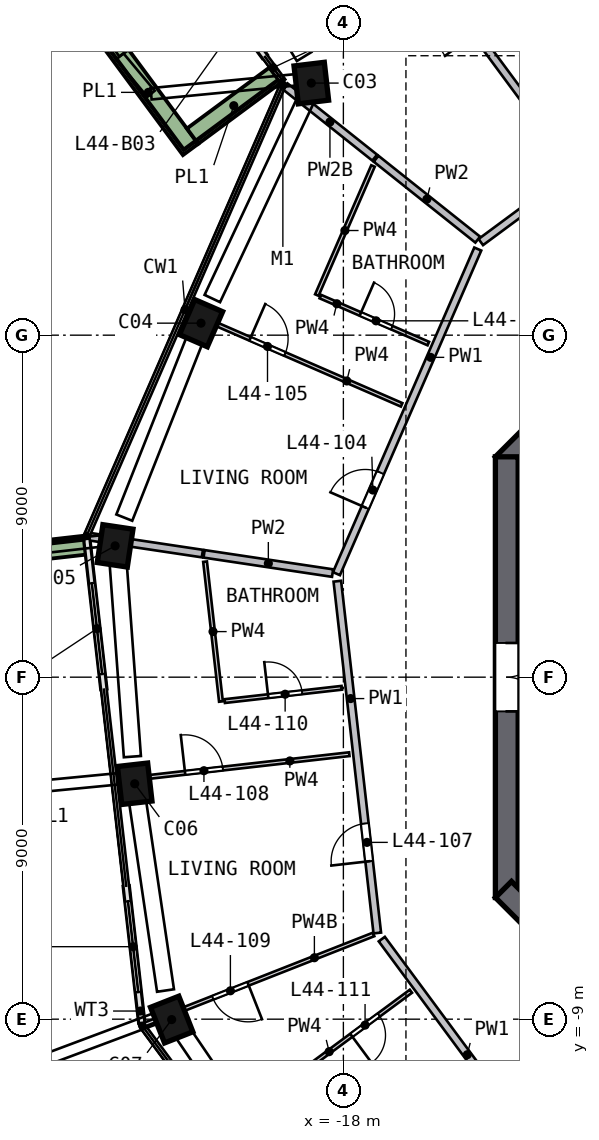
"""IFC4 building model, lengths in metres.
Left out: names, types, materials, properties, quantities, classifications, styles, units other than length and angle.
Written with IfcOpenShell. Run it as: python <this file> out.ifc"""

import sys

from ifc_helpers import new_model, si_unit, direction, frame, frame_2d, origin, origin_2d, place, context, subcontext, project, spatial, polyline, rectangle, outline, extrude, element, fill, save


model = new_model("IFC4")
c1 = context("Model", 3, precision=1e-05, world=origin(), true_north=direction((0.0, 1.0)))
c2 = subcontext(c1, "Body", "Model", "MODEL_VIEW")
j1 = project(units=[si_unit("LENGTHUNIT", "METRE"), si_unit("PLANEANGLEUNIT", "RADIAN")], contexts=[c1])
p1 = place(None, origin())
s1 = spatial("IfcSite", under=j1, at=p1, CompositionType="ELEMENT")
p2 = place(p1, origin())
s2 = spatial("IfcBuilding", under=s1, at=p2, CompositionType="ELEMENT")
p3 = place(p2, frame((0.0, 0.0, 183.5)))
s3 = spatial("IfcBuildingStorey", under=s2, at=p3, CompositionType="ELEMENT", Elevation=183.5)
p4 = place(p3, frame((-18.754, 15.742, 0.0), z_axis=(-0.074113797, -0.089772712, 0.993200889), x_axis=(-0.119035276, 0.989615937, 0.080566128)))
e1 = element("IfcColumn", 1, at=p4, inside=s3, PredefinedType="COLUMN", context=c2, shape_type="SweptSolid", body=[
    extrude(rectangle(XDim=1.0, YDim=0.8, at=origin_2d()), origin(), (0.0, 0.0, 1.0), 3.212),
])
p5 = place(p3, frame((-21.693, 9.441, 0.0), z_axis=(-0.044031928, -0.103577696, 0.99364624), x_axis=(-0.39648645, -0.911115934, -0.112544433)))
e2 = element("IfcColumn", 2, at=p5, inside=s3, PredefinedType="COLUMN", context=c2, shape_type="SweptSolid", body=[
    extrude(rectangle(XDim=1.0, YDim=0.8, at=origin_2d()), origin(), (0.0, 0.0, 1.0), 3.21),
])
p6 = place(p3, frame((-23.987, 3.594, 0.0), z_axis=(-0.016117069, -0.114187915, 0.993328425), x_axis=(0.147173067, 0.982365713, 0.115315628)))
e3 = element("IfcColumn", 3, at=p6, inside=s3, PredefinedType="COLUMN", context=c2, shape_type="SweptSolid", body=[
    extrude(rectangle(XDim=1.0, YDim=0.8, at=origin_2d()), origin(), (0.0, 0.0, 1.0), 3.211),
])
p7 = place(p3, frame((-23.507, -2.67, 0.0), z_axis=(0.013612645, -0.111714949, 0.993647053), x_axis=(0.111814551, -0.987336251, -0.112537254)))
e4 = element("IfcColumn", 4, at=p7, inside=s3, PredefinedType="COLUMN", context=c2, shape_type="SweptSolid", body=[
    extrude(rectangle(XDim=1.0, YDim=0.8, at=origin_2d()), origin(), (0.0, 0.0, 1.0), 3.21),
])
p8 = place(p3, frame((-22.57, -8.882, 0.0), z_axis=(0.043181416, -0.106965234, 0.993324622), x_axis=(-0.364010929, 0.924224428, 0.115348383)))
e5 = element("IfcColumn", 5, at=p8, inside=s3, PredefinedType="COLUMN", context=c2, shape_type="SweptSolid", body=[
    extrude(rectangle(XDim=1.0, YDim=0.8, at=origin_2d()), origin(), (0.0, 0.0, 1.0), 3.211),
])
p9 = place(p3, frame((-5.587, 13.788, 0.0), z_axis=(0.0, 0.0, 1.0), x_axis=(-0.707106781, -0.707106781, 0.0)))
e6 = element("IfcWall", 6, at=p9, inside=s3, PredefinedType="SHEAR", context=c2, shape_type="SweptSolid", body=[
    extrude(rectangle(XDim=11.598, YDim=0.6, at=frame_2d((5.799, 0.0))), origin(), (0.0, 0.0, 1.0), 3.5),
])
p10 = place(p3, frame((-13.7, 5.799, 0.0), z_axis=(0.0, 0.0, 1.0), x_axis=(0.0, -1.0, 0.0)))
e7 = element("IfcWall", 7, at=p10, inside=s3, PredefinedType="SHEAR", context=c2, shape_type="SweptSolid", body=[
    extrude(rectangle(XDim=11.598, YDim=0.6, at=frame_2d((5.799, 0.0))), origin(), (0.0, 0.0, 1.0), 3.5),
])
p11 = place(p10, frame((4.899, 0.0, 0.0)))
e8 = element("IfcOpeningElement", 8, at=p11, cuts=e7, PredefinedType="OPENING", context=c2, shape_type="SweptSolid", body=[
    extrude(rectangle(XDim=1.8, YDim=2.1, at=frame_2d((0.9, 1.05))), frame((0.0, 0.31, 0.0), z_axis=(0.0, -1.0, 0.0), x_axis=(1.0, 0.0, 0.0)), (0.0, 0.0, 1.0), 0.62),
])
p12 = place(p3, frame((-13.788, -5.587, 0.0), z_axis=(0.0, 0.0, 1.0), x_axis=(0.707106781, -0.707106781, 0.0)))
e9 = element("IfcWall", 9, at=p12, inside=s3, PredefinedType="SHEAR", context=c2, shape_type="SweptSolid", body=[
    extrude(rectangle(XDim=11.598, YDim=0.6, at=frame_2d((5.799, 0.0))), origin(), (0.0, 0.0, 1.0), 3.5),
])
p13 = place(p12, frame((2.099, 0.0, 0.0)))
e10 = element("IfcOpeningElement", 10, at=p13, cuts=e9, PredefinedType="OPENING", context=c2, shape_type="SweptSolid", body=[
    extrude(rectangle(XDim=1.2, YDim=2.1, at=frame_2d((0.6, 1.05))), frame((0.0, 0.31, 0.0), z_axis=(0.0, -1.0, 0.0), x_axis=(1.0, 0.0, 0.0)), (0.0, 0.0, 1.0), 0.62),
])
p14 = place(p3, frame((-21.978, 18.916, 0.0), z_axis=(0.0, 0.0, 1.0), x_axis=(0.594570692, -0.80404334, 0.0)))
e11 = element("IfcWall", 11, at=p14, inside=s3, PredefinedType="SOLIDWALL", context=c2, shape_type="SweptSolid", body=[
    extrude(rectangle(XDim=3.21, YDim=0.15, at=frame_2d((1.605, 0.0))), origin(), (0.0, 0.0, 1.0), 2.475),
])
p15 = place(p14, frame((1.31, 0.0, 0.0)))
e12 = element("IfcOpeningElement", 12, at=p15, cuts=e11, PredefinedType="OPENING", context=c2, shape_type="SweptSolid", body=[
    extrude(rectangle(XDim=1.5, YDim=2.4, at=frame_2d((0.75, 1.2))), frame((0.0, 0.085, 0.0), z_axis=(0.0, -1.0, 0.0), x_axis=(1.0, 0.0, 0.0)), (0.0, 0.0, 1.0), 0.17),
])
p16 = place(p3, frame((-24.751, 3.63, 0.0), z_axis=(0.0, 0.0, 1.0), x_axis=(0.112801985, -0.993617488, 0.0)))
e13 = element("IfcWall", 13, at=p16, inside=s3, PredefinedType="SOLIDWALL", context=c2, shape_type="SweptSolid", body=[
    extrude(rectangle(XDim=3.967, YDim=0.15, at=frame_2d((1.984, 0.0))), origin(), (0.0, 0.0, 1.0), 2.475),
])
p17 = place(p16, frame((1.167, 0.0, 0.0)))
e14 = element("IfcOpeningElement", 14, at=p17, cuts=e13, PredefinedType="OPENING", context=c2, shape_type="SweptSolid", body=[
    extrude(rectangle(XDim=2.4, YDim=2.4, at=frame_2d((1.2, 1.2))), frame((0.0, 0.085, 0.0), z_axis=(0.0, -1.0, 0.0), x_axis=(1.0, 0.0, 0.0)), (0.0, 0.0, 1.0), 0.17),
])
p18 = place(p3, frame((-23.714, -5.502, 0.0), z_axis=(0.0, 0.0, 1.0), x_axis=(0.112844416, -0.99361267, 0.0)))
e15 = element("IfcWall", 15, at=p18, inside=s3, PredefinedType="SOLIDWALL", context=c2, shape_type="SweptSolid", body=[
    extrude(rectangle(XDim=3.609, YDim=0.15, at=frame_2d((1.804, 0.0))), origin(), (0.0, 0.0, 1.0), 2.475),
])
p19 = place(p18, frame((0.4, 0.0, 0.0)))
e16 = element("IfcOpeningElement", 16, at=p19, cuts=e15, PredefinedType="OPENING", context=c2, shape_type="SweptSolid", body=[
    extrude(rectangle(XDim=2.4, YDim=2.4, at=frame_2d((1.2, 1.2))), frame((0.0, 0.085, 0.0), z_axis=(0.0, -1.0, 0.0), x_axis=(1.0, 0.0, 0.0)), (0.0, 0.0, 1.0), 0.17),
])
p20 = place(p3, frame((-24.243, 16.893, 0.0), z_axis=(0.0, 0.0, 1.0), x_axis=(0.594510416, -0.804087909, 0.0)))
e17 = element("IfcWall", 17, at=p20, inside=s3, PredefinedType="SOLIDWALL", context=c2, shape_type="SweptSolid", body=[
    extrude(rectangle(XDim=3.738, YDim=0.5, at=frame_2d((1.869, 0.0))), origin(), (0.0, 0.0, 1.0), 0.7),
])
p21 = place(p3, frame((-21.969, 14.237, 0.0), z_axis=(0.0, 0.0, 1.0), x_axis=(0.804127263, 0.594457185, 0.0)))
e18 = element("IfcWall", 18, at=p21, inside=s3, PredefinedType="SOLIDWALL", context=c2, shape_type="SweptSolid", body=[
    extrude(rectangle(XDim=2.699, YDim=0.5, at=frame_2d((1.35, 0.0))), origin(), (0.0, 0.0, 1.0), 0.7),
])
p22 = place(p3, frame((-24.81, 3.472, 0.0), z_axis=(0.0, 0.0, 1.0), x_axis=(-0.993617508, -0.112801803, 0.0)))
e19 = element("IfcWall", 19, at=p22, inside=s3, PredefinedType="SOLIDWALL", context=c2, shape_type="SweptSolid", body=[
    extrude(rectangle(XDim=3.199, YDim=0.5, at=frame_2d((1.6, 0.0))), origin(), (0.0, 0.0, 1.0), 0.7),
])
p23 = place(p3, origin())
e20 = element("IfcWall", 20, at=p23, inside=s3, PredefinedType="SOLIDWALL", context=c2, shape_type="SweptSolid", body=[
    extrude(outline(polyline([(-13.4, 3.9), (-9.9, 3.9), (-9.9, 3.7), (-12.9, 3.7), (-12.9, 1.4), (-9.9, 1.4), (-9.9, 1.2), (-13.4, 1.2), (-13.4, 3.9)])), origin(), (0.0, 0.0, 1.0), 3.19),
])
p24 = place(p3, origin())
e21 = element("IfcWall", 21, at=p24, inside=s3, PredefinedType="SOLIDWALL", context=c2, shape_type="SweptSolid", body=[
    extrude(outline(polyline([(-13.4, -3.9), (-13.4, -1.2), (-9.9, -1.2), (-9.9, -1.4), (-12.9, -1.4), (-12.9, -3.7), (-9.9, -3.7), (-9.9, -3.9), (-13.4, -3.9)])), origin(), (0.0, 0.0, 1.0), 3.19),
])
p25 = place(p3, frame((-17.108, -6.732, 0.0), z_axis=(0.0, 0.0, 1.0), x_axis=(-0.112835605, 0.993613671, 0.0)))
e22 = element("IfcWall", 22, at=p25, inside=s3, PredefinedType="SOLIDWALL", context=c2, shape_type="SweptSolid", body=[
    extrude(rectangle(XDim=9.317, YDim=0.2, at=frame_2d((4.658, 0.0))), origin(), (0.0, 0.0, 1.0), 3.19),
])
p26 = place(p25, frame((1.9, 0.0, 0.0)))
e23 = element("IfcOpeningElement", 23, at=p26, cuts=e22, PredefinedType="OPENING", context=c2, shape_type="SweptSolid", body=[
    extrude(rectangle(XDim=1.0, YDim=2.1, at=frame_2d((0.5, 1.05))), frame((0.0, 0.11, 0.0), z_axis=(0.0, -1.0, 0.0), x_axis=(1.0, 0.0, 0.0)), (0.0, 0.0, 1.0), 0.22),
])
p27 = place(p3, frame((-18.182, 2.724, 0.0), z_axis=(0.0, 0.0, 1.0), x_axis=(0.399077747, 0.916917091, 0.0)))
e24 = element("IfcWall", 24, at=p27, inside=s3, PredefinedType="SOLIDWALL", context=c2, shape_type="SweptSolid", body=[
    extrude(rectangle(XDim=9.316, YDim=0.2, at=frame_2d((4.658, 0.0))), origin(), (0.0, 0.0, 1.0), 3.19),
])
p28 = place(p27, frame((1.9, 0.0, 0.0)))
e25 = element("IfcOpeningElement", 25, at=p28, cuts=e24, PredefinedType="OPENING", context=c2, shape_type="SweptSolid", body=[
    extrude(rectangle(XDim=1.0, YDim=2.1, at=frame_2d((0.5, 1.05))), frame((0.0, 0.11, 0.0), z_axis=(0.0, -1.0, 0.0), x_axis=(1.0, 0.0, 0.0)), (0.0, 0.0, 1.0), 0.22),
])
p29 = place(p3, frame((-11.569, -14.223, 0.0), z_axis=(0.0, 0.0, 1.0), x_axis=(-0.594544652, 0.804062595, 0.0)))
e26 = element("IfcWall", 26, at=p29, inside=s3, PredefinedType="SOLIDWALL", context=c2, shape_type="SweptSolid", body=[
    extrude(rectangle(XDim=9.117, YDim=0.2, at=frame_2d((4.559, 0.0))), origin(), (0.0, 0.0, 1.0), 3.19),
])
p30 = place(p29, frame((0.35, 0.0, 0.0)))
e27 = element("IfcOpeningElement", 27, at=p30, cuts=e26, PredefinedType="OPENING", context=c2, shape_type="SweptSolid", body=[
    extrude(rectangle(XDim=1.0, YDim=2.1, at=frame_2d((0.5, 1.05))), frame((0.0, 0.11, 0.0), z_axis=(0.0, -1.0, 0.0), x_axis=(1.0, 0.0, 0.0)), (0.0, 0.0, 1.0), 0.22),
])
p31 = place(p3, frame((-14.384, 11.45, 0.0), z_axis=(0.0, 0.0, 1.0), x_axis=(0.804051366, 0.594559838, 0.0)))
e28 = element("IfcWall", 28, at=p31, inside=s3, PredefinedType="SOLIDWALL", context=c2, shape_type="SweptSolid", body=[
    extrude(rectangle(XDim=9.517, YDim=0.2, at=frame_2d((4.758, 0.0))), origin(), (0.0, 0.0, 1.0), 3.19),
])
p32 = place(p31, frame((3.857, 0.0, 0.0)))
e29 = element("IfcOpeningElement", 29, at=p32, cuts=e28, PredefinedType="OPENING", context=c2, shape_type="SweptSolid", body=[
    extrude(rectangle(XDim=1.8, YDim=2.1, at=frame_2d((0.9, 1.05))), frame((0.0, 0.11, 0.0), z_axis=(0.0, -1.0, 0.0), x_axis=(1.0, 0.0, 0.0)), (0.0, 0.0, 1.0), 0.22),
])
p33 = place(p3, frame((-21.71, 3.252, 0.0), z_axis=(0.0, 0.0, 1.0), x_axis=(-0.988970222, 0.148114484, 0.0)))
e30 = element("IfcWall", 30, at=p33, inside=s3, PredefinedType="SOLIDWALL", context=c2, shape_type="SweptSolid", body=[
    extrude(rectangle(XDim=3.011, YDim=0.2, at=frame_2d((1.506, 0.0))), origin(), (0.0, 0.0, 1.0), 3.19),
])
p34 = place(p3, frame((-18.284, 2.739, 0.0), z_axis=(0.0, 0.0, 1.0), x_axis=(-0.988959389, 0.148186795, 0.0)))
e31 = element("IfcWall", 31, at=p34, inside=s3, PredefinedType="SOLIDWALL", context=c2, shape_type="SweptSolid", body=[
    extrude(rectangle(XDim=3.419, YDim=0.2, at=frame_2d((1.709, 0.0))), origin(), (0.0, 0.0, 1.0), 3.19),
])
p35 = place(p3, frame((-17.176, 13.672, 0.0), z_axis=(0.0, 0.0, 1.0), x_axis=(-0.782400841, 0.62277518, 0.0)))
e32 = element("IfcWall", 32, at=p35, inside=s3, PredefinedType="SOLIDWALL", context=c2, shape_type="SweptSolid", body=[
    extrude(rectangle(XDim=3.011, YDim=0.2, at=frame_2d((1.506, 0.0))), origin(), (0.0, 0.0, 1.0), 2.69),
])
p36 = place(p3, frame((-11.965, 13.487, 0.0), z_axis=(0.0, 0.0, 1.0), x_axis=(-0.594549069, 0.804059329, 0.0)))
e33 = element("IfcWall", 33, at=p36, inside=s3, PredefinedType="SOLIDWALL", context=c2, shape_type="SweptSolid", body=[
    extrude(rectangle(XDim=13.988, YDim=0.2, at=frame_2d((6.994, 0.0))), origin(), (0.0, 0.0, 1.0), 3.19),
])
p37 = place(p36, frame((4.3, 0.0, 0.0)))
e34 = element("IfcOpeningElement", 34, at=p37, cuts=e33, PredefinedType="OPENING", context=c2, shape_type="SweptSolid", body=[
    extrude(rectangle(XDim=1.0, YDim=2.1, at=frame_2d((0.5, 1.05))), frame((0.0, 0.11, 0.0), z_axis=(0.0, -1.0, 0.0), x_axis=(1.0, 0.0, 0.0)), (0.0, 0.0, 1.0), 0.22),
])
p38 = place(p3, frame((-14.465, 11.514, 0.0), z_axis=(0.0, 0.0, 1.0), x_axis=(-0.782399362, 0.622777037, 0.0)))
e35 = element("IfcWall", 35, at=p38, inside=s3, PredefinedType="SOLIDWALL", context=c2, shape_type="SweptSolid", body=[
    extrude(rectangle(XDim=3.418, YDim=0.2, at=frame_2d((1.709, 0.0))), origin(), (0.0, 0.0, 1.0), 3.19),
])
p39 = place(p3, frame((-17.639, 26.689, 0.0), z_axis=(0.0, 0.0, 1.0), x_axis=(0.594549069, -0.804059329, 0.0)))
e36 = element("IfcWall", 36, at=p39, inside=s3, PredefinedType="SOLIDWALL", context=c2, shape_type="SweptSolid", body=[
    extrude(rectangle(XDim=13.988, YDim=0.2, at=frame_2d((6.994, 0.0))), origin(), (0.0, 0.0, 1.0), 3.19),
])
p40 = place(p39, frame((4.35, 0.0, 0.0)))
e37 = element("IfcOpeningElement", 37, at=p40, cuts=e36, PredefinedType="OPENING", context=c2, shape_type="SweptSolid", body=[
    extrude(rectangle(XDim=1.0, YDim=2.1, at=frame_2d((0.5, 1.05))), frame((0.0, 0.11, 0.0), z_axis=(0.0, -1.0, 0.0), x_axis=(1.0, 0.0, 0.0)), (0.0, 0.0, 1.0), 0.22),
])
p41 = place(p3, frame((-21.64, 3.04, 0.0), z_axis=(0.0, 0.0, 1.0), x_axis=(0.11284018, -0.993613151, 0.0)))
e38 = element("IfcWall", 38, at=p41, inside=s3, PredefinedType="PARTITIONING", context=c2, shape_type="SweptSolid", body=[
    extrude(rectangle(XDim=3.704, YDim=0.1, at=frame_2d((1.852, 0.0))), origin(), (0.0, 0.0, 1.0), 3.19),
])
p42 = place(p3, frame((-23.954, -2.721, 0.0), z_axis=(0.0, 0.0, 1.0), x_axis=(0.993611124, 0.112858027, 0.0)))
e39 = element("IfcWall", 39, at=p42, inside=s3, PredefinedType="PARTITIONING", context=c2, shape_type="SweptSolid", body=[
    extrude(rectangle(XDim=6.15, YDim=0.1, at=frame_2d((3.075, 0.0))), origin(), (0.0, 0.0, 1.0), 3.19),
])
p43 = place(p42, frame((1.8, 0.0, 0.0)))
e40 = element("IfcOpeningElement", 40, at=p43, cuts=e39, PredefinedType="OPENING", context=c2, shape_type="SweptSolid", body=[
    extrude(rectangle(XDim=1.0, YDim=2.1, at=frame_2d((0.5, 1.05))), frame((0.0, 0.06, 0.0), z_axis=(0.0, -1.0, 0.0), x_axis=(1.0, 0.0, 0.0)), (0.0, 0.0, 1.0), 0.12),
])
p44 = place(p3, frame((-17.204, -6.77, 0.0), z_axis=(0.0, 0.0, 1.0), x_axis=(-0.930544683, -0.366178362, 0.0)))
e41 = element("IfcWall", 41, at=p44, inside=s3, PredefinedType="PARTITIONING", context=c2, shape_type="SweptSolid", body=[
    extrude(rectangle(XDim=6.476, YDim=0.1, at=frame_2d((3.238, 0.0))), origin(), (0.0, 0.0, 1.0), 2.69),
])
p45 = place(p44, frame((3.55, 0.0, 0.0)))
e42 = element("IfcOpeningElement", 42, at=p45, cuts=e41, PredefinedType="OPENING", context=c2, shape_type="SweptSolid", body=[
    extrude(rectangle(XDim=1.0, YDim=2.1, at=frame_2d((0.5, 1.05))), frame((0.0, 0.06, 0.0), z_axis=(0.0, -1.0, 0.0), x_axis=(1.0, 0.0, 0.0)), (0.0, 0.0, 1.0), 0.12),
])
p46 = place(p3, frame((-21.122, -0.629, 0.0), z_axis=(0.0, 0.0, 1.0), x_axis=(0.993611879, 0.112851377, 0.0)))
e43 = element("IfcWall", 43, at=p46, inside=s3, PredefinedType="PARTITIONING", context=c2, shape_type="SweptSolid", body=[
    extrude(rectangle(XDim=3.1, YDim=0.1, at=frame_2d((1.55, 0.0))), origin(), (0.0, 0.0, 1.0), 3.19),
])
p47 = place(p46, frame((1.15, 0.0, 0.0)))
e44 = element("IfcOpeningElement", 44, at=p47, cuts=e43, PredefinedType="OPENING", context=c2, shape_type="SweptSolid", body=[
    extrude(rectangle(XDim=0.9, YDim=2.1, at=frame_2d((0.45, 1.05))), frame((0.0, 0.06, 0.0), z_axis=(0.0, -1.0, 0.0), x_axis=(1.0, 0.0, 0.0)), (0.0, 0.0, 1.0), 0.12),
])
p48 = place(p3, frame((-22.105, 9.621, 0.0), z_axis=(0.0, 0.0, 1.0), x_axis=(0.916919155, -0.399073005, 0.0)))
e45 = element("IfcWall", 45, at=p48, inside=s3, PredefinedType="PARTITIONING", context=c2, shape_type="SweptSolid", body=[
    extrude(rectangle(XDim=6.15, YDim=0.1, at=frame_2d((3.075, 0.0))), origin(), (0.0, 0.0, 1.0), 3.19),
])
p49 = place(p48, frame((1.8, 0.0, 0.0)))
e46 = element("IfcOpeningElement", 46, at=p49, cuts=e45, PredefinedType="OPENING", context=c2, shape_type="SweptSolid", body=[
    extrude(rectangle(XDim=1.0, YDim=2.1, at=frame_2d((0.5, 1.05))), frame((0.0, 0.06, 0.0), z_axis=(0.0, -1.0, 0.0), x_axis=(1.0, 0.0, 0.0)), (0.0, 0.0, 1.0), 0.12),
])
p50 = place(p3, frame((-17.221, 13.452, 0.0), z_axis=(0.0, 0.0, 1.0), x_axis=(-0.399044236, -0.916931676, 0.0)))
e47 = element("IfcWall", 47, at=p50, inside=s3, PredefinedType="PARTITIONING", context=c2, shape_type="SweptSolid", body=[
    extrude(rectangle(XDim=3.704, YDim=0.1, at=frame_2d((1.852, 0.0))), origin(), (0.0, 0.0, 1.0), 3.19),
])
p51 = place(p3, frame((-16.223, -8.265, 0.0), z_axis=(0.0, 0.0, 1.0), x_axis=(-0.804092095, -0.594504754, 0.0)))
e48 = element("IfcWall", 48, at=p51, inside=s3, PredefinedType="PARTITIONING", context=c2, shape_type="SweptSolid", body=[
    extrude(rectangle(XDim=3.2, YDim=0.1, at=frame_2d((1.6, 0.0))), origin(), (0.0, 0.0, 1.0), 3.19),
])
p52 = place(p51, frame((1.05, 0.0, 0.0)))
e49 = element("IfcOpeningElement", 49, at=p52, cuts=e48, PredefinedType="OPENING", context=c2, shape_type="SweptSolid", body=[
    extrude(rectangle(XDim=0.9, YDim=2.1, at=frame_2d((0.45, 1.05))), frame((0.0, 0.06, 0.0), z_axis=(0.0, -1.0, 0.0), x_axis=(1.0, 0.0, 0.0)), (0.0, 0.0, 1.0), 0.12),
])
p53 = place(p3, frame((-18.607, 10.016, 0.0), z_axis=(0.0, 0.0, 1.0), x_axis=(0.916902206, -0.399111945, 0.0)))
e50 = element("IfcWall", 50, at=p53, inside=s3, PredefinedType="PARTITIONING", context=c2, shape_type="SweptSolid", body=[
    extrude(rectangle(XDim=3.1, YDim=0.1, at=frame_2d((1.55, 0.0))), origin(), (0.0, 0.0, 1.0), 3.19),
])
p54 = place(p53, frame((1.15, 0.0, 0.0)))
e51 = element("IfcOpeningElement", 51, at=p54, cuts=e50, PredefinedType="OPENING", context=c2, shape_type="SweptSolid", body=[
    extrude(rectangle(XDim=0.9, YDim=2.1, at=frame_2d((0.45, 1.05))), frame((0.0, 0.06, 0.0), z_axis=(0.0, -1.0, 0.0), x_axis=(1.0, 0.0, 0.0)), (0.0, 0.0, 1.0), 0.12),
])
p55 = place(p17, origin())
e52 = element("IfcDoor", 52, at=p55, inside=s3, OperationType="SLIDING_TO_LEFT", PredefinedType="DOOR", context=c2, shape_type="SweptSolid", body=[
    extrude(rectangle(XDim=2.4, YDim=2.4, at=frame_2d((1.2, 1.2))), frame((0.0, 0.025, 0.0), z_axis=(0.0, -1.0, 0.0), x_axis=(1.0, 0.0, 0.0)), (0.0, 0.0, 1.0), 0.05),
])
fill(e14, e52)
p56 = place(p19, origin())
e53 = element("IfcDoor", 53, at=p56, inside=s3, OperationType="SLIDING_TO_RIGHT", PredefinedType="DOOR", context=c2, shape_type="SweptSolid", body=[
    extrude(rectangle(XDim=2.4, YDim=2.4, at=frame_2d((1.2, 1.2))), frame((0.0, 0.025, 0.0), z_axis=(0.0, -1.0, 0.0), x_axis=(1.0, 0.0, 0.0)), (0.0, 0.0, 1.0), 0.05),
])
fill(e16, e53)
p57 = place(p11, origin())
e54 = element("IfcDoor", 54, at=p57, inside=s3, OperationType="DOUBLE_DOOR_SINGLE_SWING", PredefinedType="DOOR", context=c2, shape_type="SweptSolid", body=[
    extrude(rectangle(XDim=1.8, YDim=2.1, at=frame_2d((0.9, 1.05))), frame((0.0, 0.025, 0.0), z_axis=(0.0, -1.0, 0.0), x_axis=(1.0, 0.0, 0.0)), (0.0, 0.0, 1.0), 0.05),
])
fill(e8, e54)
p58 = place(p28, origin())
e55 = element("IfcDoor", 55, at=p58, inside=s3, OperationType="SINGLE_SWING_LEFT", PredefinedType="DOOR", context=c2, shape_type="SweptSolid", body=[
    extrude(rectangle(XDim=1.0, YDim=2.1, at=frame_2d((0.5, 1.05))), frame((0.0, 0.025, 0.0), z_axis=(0.0, -1.0, 0.0), x_axis=(1.0, 0.0, 0.0)), (0.0, 0.0, 1.0), 0.05),
])
fill(e25, e55)
p59 = place(p49, origin())
e56 = element("IfcDoor", 56, at=p59, inside=s3, OperationType="SINGLE_SWING_LEFT", PredefinedType="DOOR", context=c2, shape_type="SweptSolid", body=[
    extrude(rectangle(XDim=1.0, YDim=2.1, at=frame_2d((0.5, 1.05))), frame((0.0, 0.025, 0.0), z_axis=(0.0, -1.0, 0.0), x_axis=(1.0, 0.0, 0.0)), (0.0, 0.0, 1.0), 0.05),
])
fill(e46, e56)
p60 = place(p54, origin())
e57 = element("IfcDoor", 57, at=p60, inside=s3, OperationType="SINGLE_SWING_LEFT", PredefinedType="DOOR", context=c2, shape_type="SweptSolid", body=[
    extrude(rectangle(XDim=0.9, YDim=2.1, at=frame_2d((0.45, 1.05))), frame((0.0, 0.025, 0.0), z_axis=(0.0, -1.0, 0.0), x_axis=(1.0, 0.0, 0.0)), (0.0, 0.0, 1.0), 0.05),
])
fill(e51, e57)
p61 = place(p26, origin())
e58 = element("IfcDoor", 58, at=p61, inside=s3, OperationType="SINGLE_SWING_LEFT", PredefinedType="DOOR", context=c2, shape_type="SweptSolid", body=[
    extrude(rectangle(XDim=1.0, YDim=2.1, at=frame_2d((0.5, 1.05))), frame((0.0, 0.025, 0.0), z_axis=(0.0, -1.0, 0.0), x_axis=(1.0, 0.0, 0.0)), (0.0, 0.0, 1.0), 0.05),
])
fill(e23, e58)
p62 = place(p43, origin())
e59 = element("IfcDoor", 59, at=p62, inside=s3, OperationType="SINGLE_SWING_LEFT", PredefinedType="DOOR", context=c2, shape_type="SweptSolid", body=[
    extrude(rectangle(XDim=1.0, YDim=2.1, at=frame_2d((0.5, 1.05))), frame((0.0, 0.025, 0.0), z_axis=(0.0, -1.0, 0.0), x_axis=(1.0, 0.0, 0.0)), (0.0, 0.0, 1.0), 0.05),
])
fill(e40, e59)
p63 = place(p45, origin())
e60 = element("IfcDoor", 60, at=p63, inside=s3, OperationType="SINGLE_SWING_LEFT", PredefinedType="DOOR", context=c2, shape_type="SweptSolid", body=[
    extrude(rectangle(XDim=1.0, YDim=2.1, at=frame_2d((0.5, 1.05))), frame((0.0, 0.025, 0.0), z_axis=(0.0, -1.0, 0.0), x_axis=(1.0, 0.0, 0.0)), (0.0, 0.0, 1.0), 0.05),
])
fill(e42, e60)
p64 = place(p47, origin())
e61 = element("IfcDoor", 61, at=p64, inside=s3, OperationType="SINGLE_SWING_LEFT", PredefinedType="DOOR", context=c2, shape_type="SweptSolid", body=[
    extrude(rectangle(XDim=0.9, YDim=2.1, at=frame_2d((0.45, 1.05))), frame((0.0, 0.025, 0.0), z_axis=(0.0, -1.0, 0.0), x_axis=(1.0, 0.0, 0.0)), (0.0, 0.0, 1.0), 0.05),
])
fill(e44, e61)
p65 = place(p52, origin())
e62 = element("IfcDoor", 62, at=p65, inside=s3, OperationType="SINGLE_SWING_RIGHT", PredefinedType="DOOR", context=c2, shape_type="SweptSolid", body=[
    extrude(rectangle(XDim=0.9, YDim=2.1, at=frame_2d((0.45, 1.05))), frame((0.0, 0.025, 0.0), z_axis=(0.0, -1.0, 0.0), x_axis=(1.0, 0.0, 0.0)), (0.0, 0.0, 1.0), 0.05),
])
fill(e49, e62)
save(model, sys.argv[1])
